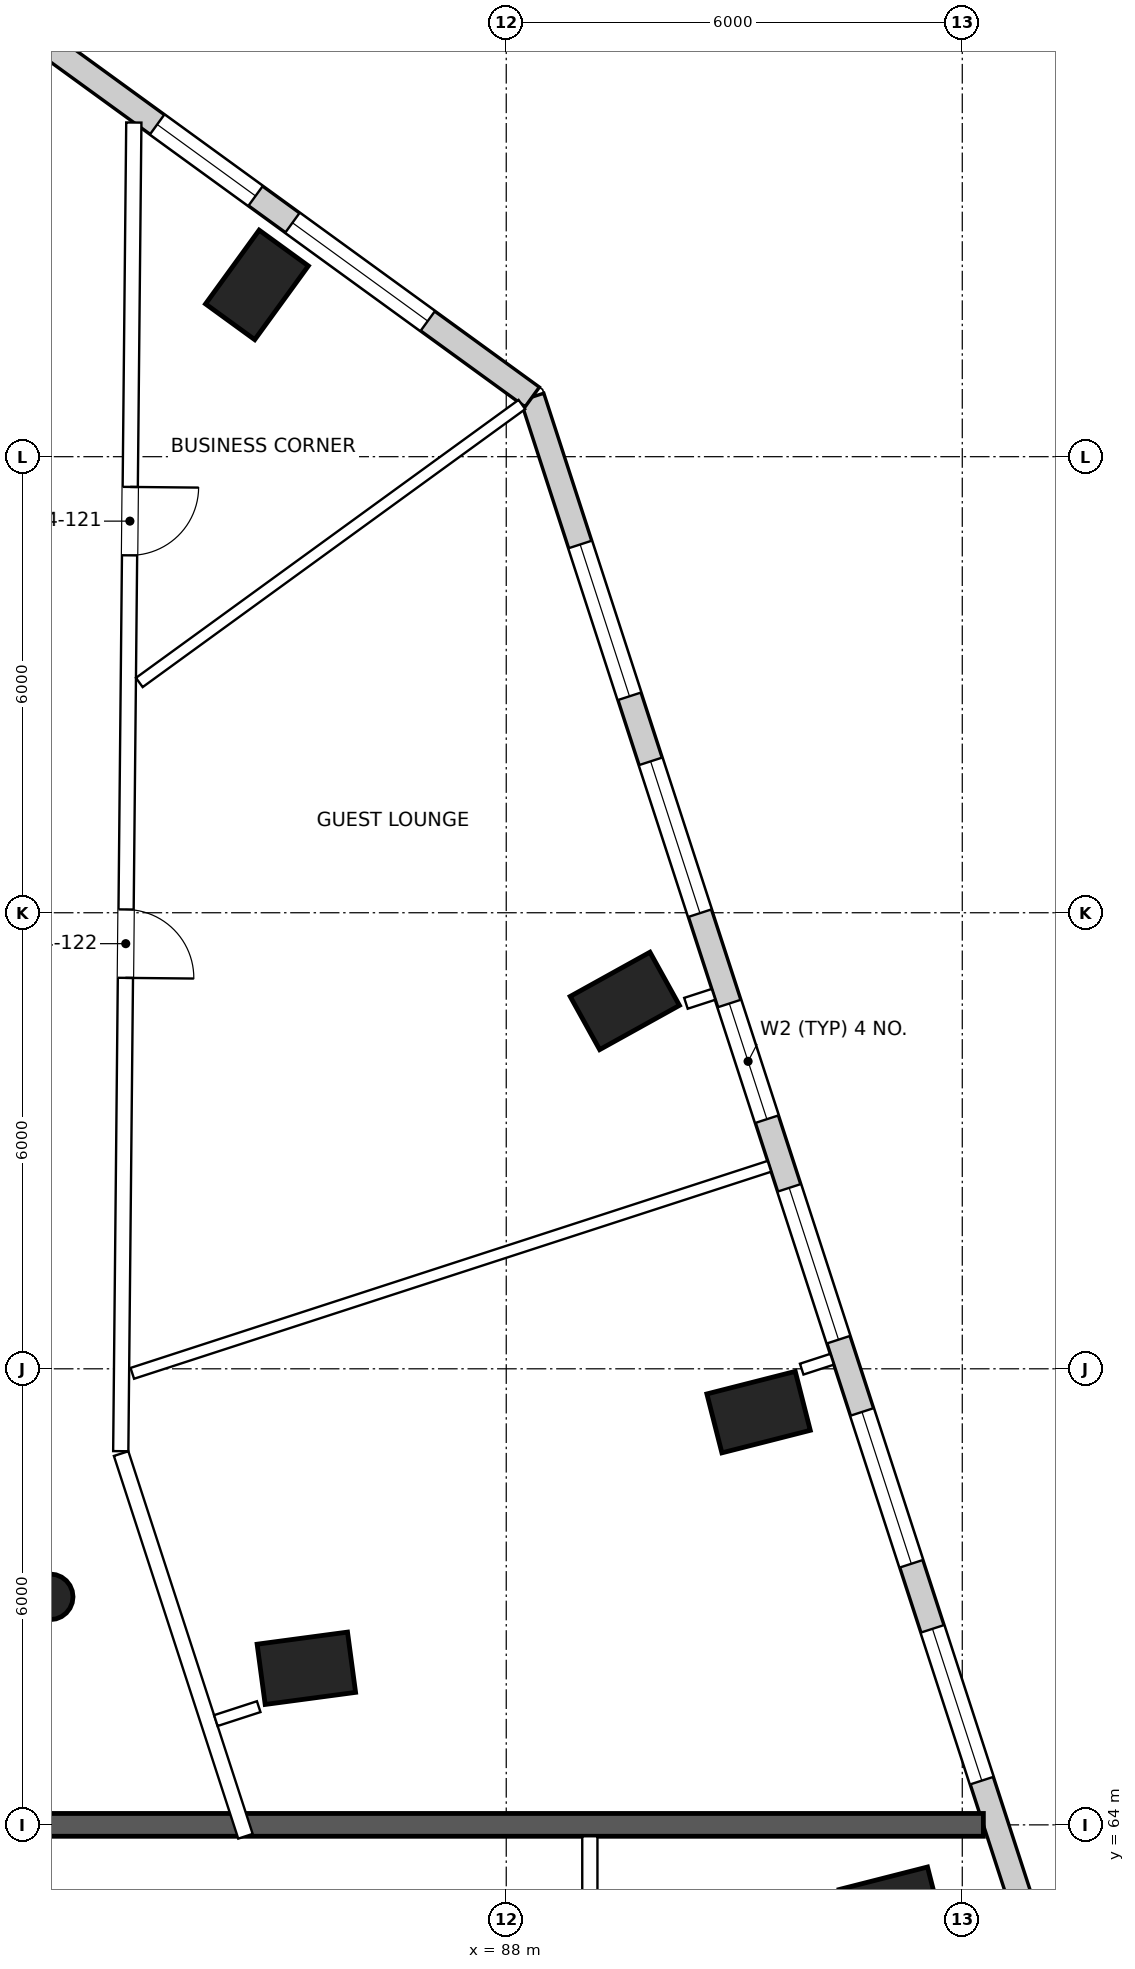
"""IFC4 building model, lengths in metres.
Left out: names, types, materials, properties, quantities, classifications, styles, units other than length and angle.
Written with IfcOpenShell. Run it as: python <this file> out.ifc"""

import sys

from ifc_helpers import new_model, si_unit, direction, frame, frame_2d, origin, origin_2d, place, context, subcontext, project, spatial, rectangle, circle, extrude, element, fill, save


model = new_model("IFC4")
c1 = context("Model", 3, precision=1e-05, world=origin(), true_north=direction((0.0, 1.0)))
c2 = subcontext(c1, "Body", "Model", "MODEL_VIEW")
j1 = project(units=[si_unit("LENGTHUNIT", "METRE"), si_unit("PLANEANGLEUNIT", "RADIAN")], contexts=[c1])
p1 = place(None, origin())
s1 = spatial("IfcSite", under=j1, at=p1, CompositionType="ELEMENT")
p2 = place(p1, origin())
s2 = spatial("IfcBuilding", under=s1, at=p2, CompositionType="ELEMENT")
p3 = place(p2, frame((0.0, 0.0, 204.3)))
s3 = spatial("IfcBuildingStorey", under=s2, at=p3, CompositionType="ELEMENT", Elevation=204.3)
for number, where, z_axis, x_axis in (
    (1, (93.06, 62.91, 0.0), (0.0, 0.0, 1.0), (0.247, -0.969, 0.0)),
    (2, (91.32, 69.43, 0.0), (0.0, 0.0, 1.0), (0.247, -0.969, 0.0)),
    (3, (89.56, 74.84, 0.0), (0.0, 0.0, 1.0), (0.485, -0.875, 0.0)),
    (4, (84.72, 84.26, 0.0), (0.0, 0.0, 1.0), (0.809, -0.588, 0.0)),
    (5, (85.37, 66.06, 0.0), (0.0, 0.0, 1.0), (0.133, -0.991, 0.0)),
):
    element("IfcColumn", number, at=place(p3, frame(where, z_axis=z_axis, x_axis=x_axis)), inside=s3, PredefinedType="COLUMN", context=c2, shape_type="SweptSolid", body=[
        extrude(rectangle(XDim=0.8, YDim=1.2, at=origin_2d()), origin(), (0.0, 0.0, 1.0), 3.9),
    ])
p4 = place(p3, frame((82.0, 67.0, 0.0), z_axis=(0.0, 0.0, 1.0), x_axis=(1.0, 0.0, 0.0)))
e6 = element("IfcColumn", 6, at=p4, inside=s3, PredefinedType="COLUMN", context=c2, shape_type="SweptSolid", body=[
    extrude(circle(Radius=0.3, at=origin_2d()), origin(), (0.0, 0.0, 1.0), 3.9),
])
p5 = place(p3, frame((94.887, 62.642, 0.0), z_axis=(0.0, 0.0, 1.0), x_axis=(-0.309019087741, 0.951055836117, 0.0)))
e7 = element("IfcWall", 7, at=p5, inside=s3, PredefinedType="SOLIDWALL", context=c2, shape_type="SweptSolid", body=[
    extrude(rectangle(XDim=21.18, YDim=0.32, at=frame_2d((10.59, 0.0))), origin(), (0.0, 0.0, 1.0), 3.6),
])
p6 = place(p5, frame((2.04, 0.0, 0.75)))
e8 = element("IfcOpeningElement", 8, at=p6, cuts=e7, PredefinedType="OPENING", context=c2, shape_type="SweptSolid", body=[
    extrude(rectangle(XDim=2.1, YDim=2.1, at=frame_2d((1.05, 1.05))), frame((0.0, 0.17, 0.0), z_axis=(0.0, -1.0, 0.0), x_axis=(1.0, 0.0, 0.0)), (0.0, 0.0, 1.0), 0.34),
])
p7 = place(p5, frame((5.04, 0.0, 0.75)))
e9 = element("IfcOpeningElement", 9, at=p7, cuts=e7, PredefinedType="OPENING", context=c2, shape_type="SweptSolid", body=[
    extrude(rectangle(XDim=2.1, YDim=2.1, at=frame_2d((1.05, 1.05))), frame((0.0, 0.17, 0.0), z_axis=(0.0, -1.0, 0.0), x_axis=(1.0, 0.0, 0.0)), (0.0, 0.0, 1.0), 0.34),
])
p8 = place(p5, frame((8.14, 0.0, 0.75)))
e10 = element("IfcOpeningElement", 10, at=p8, cuts=e7, PredefinedType="OPENING", context=c2, shape_type="SweptSolid", body=[
    extrude(rectangle(XDim=2.1, YDim=2.1, at=frame_2d((1.05, 1.05))), frame((0.0, 0.17, 0.0), z_axis=(0.0, -1.0, 0.0), x_axis=(1.0, 0.0, 0.0)), (0.0, 0.0, 1.0), 0.34),
])
p9 = place(p5, frame((11.19, 0.0, 0.9)))
e11 = element("IfcOpeningElement", 11, at=p9, cuts=e7, PredefinedType="OPENING", context=c2, shape_type="SweptSolid", body=[
    extrude(rectangle(XDim=1.6, YDim=1.8, at=frame_2d((0.8, 0.9))), frame((0.0, 0.17, 0.0), z_axis=(0.0, -1.0, 0.0), x_axis=(1.0, 0.0, 0.0)), (0.0, 0.0, 1.0), 0.34),
])
p10 = place(p5, frame((14.04, 0.0, 0.75)))
e12 = element("IfcOpeningElement", 12, at=p10, cuts=e7, PredefinedType="OPENING", context=c2, shape_type="SweptSolid", body=[
    extrude(rectangle(XDim=2.1, YDim=2.1, at=frame_2d((1.05, 1.05))), frame((0.0, 0.17, 0.0), z_axis=(0.0, -1.0, 0.0), x_axis=(1.0, 0.0, 0.0)), (0.0, 0.0, 1.0), 0.34),
])
p11 = place(p5, frame((17.04, 0.0, 0.75)))
e13 = element("IfcOpeningElement", 13, at=p11, cuts=e7, PredefinedType="OPENING", context=c2, shape_type="SweptSolid", body=[
    extrude(rectangle(XDim=2.1, YDim=2.1, at=frame_2d((1.05, 1.05))), frame((0.0, 0.17, 0.0), z_axis=(0.0, -1.0, 0.0), x_axis=(1.0, 0.0, 0.0)), (0.0, 0.0, 1.0), 0.34),
])
p12 = place(p3, frame((88.342, 82.785, 0.0), z_axis=(0.0, 0.0, 1.0), x_axis=(-0.809010998506, 0.58779350481, 0.0)))
e14 = element("IfcWall", 14, at=p12, inside=s3, PredefinedType="SOLIDWALL", context=c2, shape_type="SweptSolid", body=[
    extrude(rectangle(XDim=8.599, YDim=0.32, at=frame_2d((4.3, 0.0))), origin(), (0.0, 0.0, 1.0), 3.6),
])
p13 = place(p12, frame((1.7, 0.0, 0.75)))
e15 = element("IfcOpeningElement", 15, at=p13, cuts=e14, PredefinedType="OPENING", context=c2, shape_type="SweptSolid", body=[
    extrude(rectangle(XDim=2.2, YDim=2.1, at=frame_2d((1.1, 1.05))), frame((0.0, 0.17, 0.0), z_axis=(0.0, -1.0, 0.0), x_axis=(1.0, 0.0, 0.0)), (0.0, 0.0, 1.0), 0.34),
])
p14 = place(p12, frame((4.5, 0.0, 0.9)))
e16 = element("IfcOpeningElement", 16, at=p14, cuts=e14, PredefinedType="OPENING", context=c2, shape_type="SweptSolid", body=[
    extrude(rectangle(XDim=1.6, YDim=1.8, at=frame_2d((0.8, 0.9))), frame((0.0, 0.17, 0.0), z_axis=(0.0, -1.0, 0.0), x_axis=(1.0, 0.0, 0.0)), (0.0, 0.0, 1.0), 0.34),
])
p15 = place(p3, frame((45.722, 64.0, 0.0), z_axis=(0.0, 0.0, 1.0), x_axis=(1.0, 0.0, 0.0)))
e17 = element("IfcWall", 17, at=p15, inside=s3, PredefinedType="PARTITIONING", context=c2, shape_type="SweptSolid", body=[
    extrude(rectangle(XDim=48.555, YDim=0.3, at=frame_2d((24.278, 0.0))), origin(), (0.0, 0.0, 1.0), 3.05),
])
p16 = place(p15, frame((16.018, 0.0, 0.0)))
e18 = element("IfcOpeningElement", 18, at=p16, cuts=e17, PredefinedType="OPENING", context=c2, shape_type="SweptSolid", body=[
    extrude(rectangle(XDim=2.0, YDim=2.1, at=frame_2d((1.0, 1.05))), frame((0.0, 0.16, 0.0), z_axis=(0.0, -1.0, 0.0), x_axis=(1.0, 0.0, 0.0)), (0.0, 0.0, 1.0), 0.32),
])
p17 = place(p15, frame((30.538, 0.0, 0.0)))
e19 = element("IfcOpeningElement", 19, at=p17, cuts=e17, PredefinedType="OPENING", context=c2, shape_type="SweptSolid", body=[
    extrude(rectangle(XDim=2.0, YDim=2.1, at=frame_2d((1.0, 1.05))), frame((0.0, 0.16, 0.0), z_axis=(0.0, -1.0, 0.0), x_axis=(1.0, 0.0, 0.0)), (0.0, 0.0, 1.0), 0.32),
])
p18 = place(p3, frame((83.1, 86.396, 0.0), z_axis=(0.0, 0.0, 1.0), x_axis=(-0.009846166448, -0.999951525328, 0.0)))
e20 = element("IfcWall", 20, at=p18, inside=s3, PredefinedType="PARTITIONING", context=c2, shape_type="SweptSolid", body=[
    extrude(rectangle(XDim=17.481, YDim=0.2, at=frame_2d((8.74, 0.0))), origin(), (0.0, 0.0, 1.0), 3.15),
])
p19 = place(p18, frame((4.794, 0.0, 0.0)))
e21 = element("IfcOpeningElement", 21, at=p19, cuts=e20, PredefinedType="OPENING", context=c2, shape_type="SweptSolid", body=[
    extrude(rectangle(XDim=0.9, YDim=2.1, at=frame_2d((0.45, 1.05))), frame((0.0, 0.11, 0.0), z_axis=(0.0, -1.0, 0.0), x_axis=(1.0, 0.0, 0.0)), (0.0, 0.0, 1.0), 0.22),
])
p20 = place(p18, frame((10.354, 0.0, 0.0)))
e22 = element("IfcOpeningElement", 22, at=p20, cuts=e20, PredefinedType="OPENING", context=c2, shape_type="SweptSolid", body=[
    extrude(rectangle(XDim=0.9, YDim=2.1, at=frame_2d((0.45, 1.05))), frame((0.0, 0.11, 0.0), z_axis=(0.0, -1.0, 0.0), x_axis=(1.0, 0.0, 0.0)), (0.0, 0.0, 1.0), 0.22),
])
p21 = place(p3, frame((82.933, 68.885, 0.0), z_axis=(0.0, 0.0, 1.0), x_axis=(0.309009941901, -0.951058807754, 0.0)))
e23 = element("IfcWall", 23, at=p21, inside=s3, PredefinedType="PARTITIONING", context=c2, shape_type="SweptSolid", body=[
    extrude(rectangle(XDim=5.293, YDim=0.2, at=frame_2d((2.647, 0.0))), origin(), (0.0, 0.0, 1.0), 3.6),
])
p22 = place(p3, frame((89.1, 63.85, 0.0), z_axis=(0.0, 0.0, 1.0), x_axis=(0.0, -1.0, 0.0)))
e24 = element("IfcWall", 24, at=p22, inside=s3, PredefinedType="PARTITIONING", context=c2, shape_type="SweptSolid", body=[
    extrude(rectangle(XDim=7.95, YDim=0.2, at=frame_2d((3.975, 0.0))), origin(), (0.0, 0.0, 1.0), 2.9),
])
p23 = place(p22, frame((4.461, 0.0, 0.0)))
e25 = element("IfcOpeningElement", 25, at=p23, cuts=e24, PredefinedType="OPENING", context=c2, shape_type="SweptSolid", body=[
    extrude(rectangle(XDim=0.9, YDim=2.1, at=frame_2d((0.45, 1.05))), frame((0.0, 0.11, 0.0), z_axis=(0.0, -1.0, 0.0), x_axis=(1.0, 0.0, 0.0)), (0.0, 0.0, 1.0), 0.22),
])
p24 = place(p3, frame((88.206, 82.687, 0.0), z_axis=(0.0, 0.0, 1.0), x_axis=(-0.809027823237, -0.587770347354, 0.0)))
e26 = element("IfcWall", 26, at=p24, inside=s3, PredefinedType="PARTITIONING", context=c2, shape_type="SweptSolid", body=[
    extrude(rectangle(XDim=6.222, YDim=0.15, at=frame_2d((3.111, 0.0))), origin(), (0.0, 0.0, 1.0), 2.9),
])
p25 = place(p3, frame((91.462, 72.664, 0.0), z_axis=(0.0, 0.0, 1.0), x_axis=(-0.951054829907, -0.309022184495, 0.0)))
e27 = element("IfcWall", 27, at=p25, inside=s3, PredefinedType="PARTITIONING", context=c2, shape_type="SweptSolid", body=[
    extrude(rectangle(XDim=8.814, YDim=0.15, at=frame_2d((4.407, 0.0))), origin(), (0.0, 0.0, 1.0), 3.15),
])
p26 = place(p3, frame((91.887, 69.996, 0.0), z_axis=(0.0, 0.0, 1.0), x_axis=(0.951093789288, 0.30890225635, 0.0)))
e28 = element("IfcWall", 28, at=p26, inside=s3, PredefinedType="PARTITIONING", context=c2, shape_type="SweptSolid", body=[
    extrude(rectangle(XDim=0.42, YDim=0.15, at=frame_2d((0.21, 0.0))), origin(), (0.0, 0.0, 1.0), 3.6),
])
p27 = place(p3, frame((90.365, 74.809, 0.0), z_axis=(0.0, 0.0, 1.0), x_axis=(0.951024661998, 0.309115014633, 0.0)))
e29 = element("IfcWall", 29, at=p27, inside=s3, PredefinedType="PARTITIONING", context=c2, shape_type="SweptSolid", body=[
    extrude(rectangle(XDim=0.382, YDim=0.15, at=frame_2d((0.191, 0.0))), origin(), (0.0, 0.0, 1.0), 3.6),
])
p28 = place(p3, frame((84.743, 65.555, 0.0), z_axis=(0.0, 0.0, 1.0), x_axis=(-0.9510855144, -0.308927733131, 0.0)))
e30 = element("IfcWall", 30, at=p28, inside=s3, PredefinedType="PARTITIONING", context=c2, shape_type="SweptSolid", body=[
    extrude(rectangle(XDim=0.593, YDim=0.15, at=frame_2d((0.296, 0.0))), origin(), (0.0, 0.0, 1.0), 3.6),
])
p29 = place(p6, origin())
e31 = element("IfcWindow", 31, at=p29, inside=s3, PartitioningType="SINGLE_PANEL", PredefinedType="WINDOW", context=c2, shape_type="SweptSolid", body=[
    extrude(rectangle(XDim=2.1, YDim=2.1, at=frame_2d((1.05, 1.05))), frame((0.0, 0.07, 0.0), z_axis=(0.0, -1.0, 0.0), x_axis=(1.0, 0.0, 0.0)), (0.0, 0.0, 1.0), 0.06),
])
fill(e8, e31)
p30 = place(p7, origin())
e32 = element("IfcWindow", 32, at=p30, inside=s3, PartitioningType="SINGLE_PANEL", PredefinedType="WINDOW", context=c2, shape_type="SweptSolid", body=[
    extrude(rectangle(XDim=2.1, YDim=2.1, at=frame_2d((1.05, 1.05))), frame((0.0, 0.07, 0.0), z_axis=(0.0, -1.0, 0.0), x_axis=(1.0, 0.0, 0.0)), (0.0, 0.0, 1.0), 0.06),
])
fill(e9, e32)
p31 = place(p8, origin())
e33 = element("IfcWindow", 33, at=p31, inside=s3, PartitioningType="SINGLE_PANEL", PredefinedType="WINDOW", context=c2, shape_type="SweptSolid", body=[
    extrude(rectangle(XDim=2.1, YDim=2.1, at=frame_2d((1.05, 1.05))), frame((0.0, 0.07, 0.0), z_axis=(0.0, -1.0, 0.0), x_axis=(1.0, 0.0, 0.0)), (0.0, 0.0, 1.0), 0.06),
])
fill(e10, e33)
p32 = place(p9, origin())
e34 = element("IfcWindow", 34, at=p32, inside=s3, PartitioningType="SINGLE_PANEL", PredefinedType="WINDOW", context=c2, shape_type="SweptSolid", body=[
    extrude(rectangle(XDim=1.6, YDim=1.8, at=frame_2d((0.8, 0.9))), frame((0.0, 0.07, 0.0), z_axis=(0.0, -1.0, 0.0), x_axis=(1.0, 0.0, 0.0)), (0.0, 0.0, 1.0), 0.06),
])
fill(e11, e34)
p33 = place(p10, origin())
e35 = element("IfcWindow", 35, at=p33, inside=s3, PartitioningType="SINGLE_PANEL", PredefinedType="WINDOW", context=c2, shape_type="SweptSolid", body=[
    extrude(rectangle(XDim=2.1, YDim=2.1, at=frame_2d((1.05, 1.05))), frame((0.0, 0.07, 0.0), z_axis=(0.0, -1.0, 0.0), x_axis=(1.0, 0.0, 0.0)), (0.0, 0.0, 1.0), 0.06),
])
fill(e12, e35)
p34 = place(p11, origin())
e36 = element("IfcWindow", 36, at=p34, inside=s3, PartitioningType="SINGLE_PANEL", PredefinedType="WINDOW", context=c2, shape_type="SweptSolid", body=[
    extrude(rectangle(XDim=2.1, YDim=2.1, at=frame_2d((1.05, 1.05))), frame((0.0, 0.07, 0.0), z_axis=(0.0, -1.0, 0.0), x_axis=(1.0, 0.0, 0.0)), (0.0, 0.0, 1.0), 0.06),
])
fill(e13, e36)
p35 = place(p13, origin())
e37 = element("IfcWindow", 37, at=p35, inside=s3, PartitioningType="SINGLE_PANEL", PredefinedType="WINDOW", context=c2, shape_type="SweptSolid", body=[
    extrude(rectangle(XDim=2.2, YDim=2.1, at=frame_2d((1.1, 1.05))), frame((0.0, 0.07, 0.0), z_axis=(0.0, -1.0, 0.0), x_axis=(1.0, 0.0, 0.0)), (0.0, 0.0, 1.0), 0.06),
])
fill(e15, e37)
p36 = place(p14, origin())
e38 = element("IfcWindow", 38, at=p36, inside=s3, PartitioningType="SINGLE_PANEL", PredefinedType="WINDOW", context=c2, shape_type="SweptSolid", body=[
    extrude(rectangle(XDim=1.6, YDim=1.8, at=frame_2d((0.8, 0.9))), frame((0.0, 0.07, 0.0), z_axis=(0.0, -1.0, 0.0), x_axis=(1.0, 0.0, 0.0)), (0.0, 0.0, 1.0), 0.06),
])
fill(e16, e38)
p37 = place(p19, origin())
e39 = element("IfcDoor", 39, at=p37, inside=s3, OperationType="SINGLE_SWING_LEFT", PredefinedType="DOOR", context=c2, shape_type="SweptSolid", body=[
    extrude(rectangle(XDim=0.9, YDim=2.1, at=frame_2d((0.45, 1.05))), frame((0.0, 0.025, 0.0), z_axis=(0.0, -1.0, 0.0), x_axis=(1.0, 0.0, 0.0)), (0.0, 0.0, 1.0), 0.05),
])
fill(e21, e39)
p38 = place(p20, origin())
e40 = element("IfcDoor", 40, at=p38, inside=s3, OperationType="SINGLE_SWING_RIGHT", PredefinedType="DOOR", context=c2, shape_type="SweptSolid", body=[
    extrude(rectangle(XDim=0.9, YDim=2.1, at=frame_2d((0.45, 1.05))), frame((0.0, 0.025, 0.0), z_axis=(0.0, -1.0, 0.0), x_axis=(1.0, 0.0, 0.0)), (0.0, 0.0, 1.0), 0.05),
])
fill(e22, e40)
save(model, sys.argv[1])
